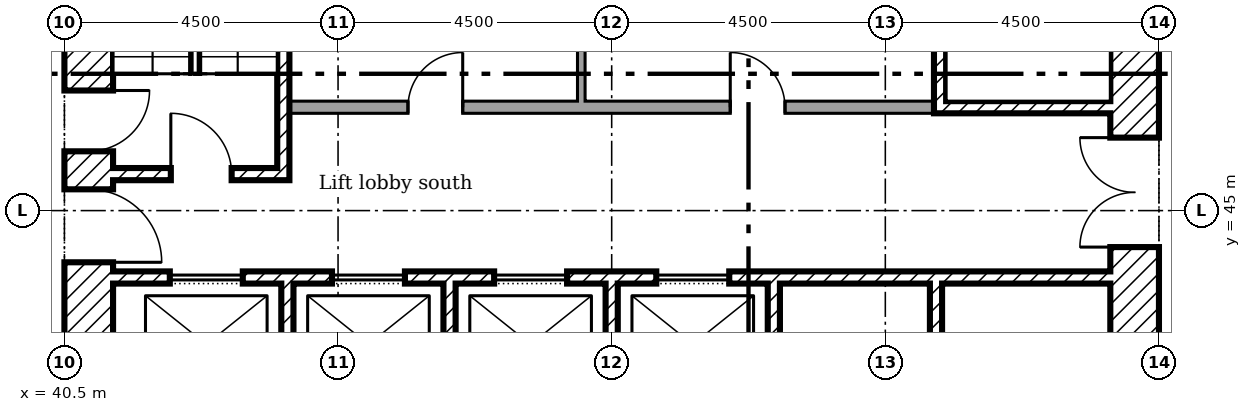
"""IFC4 building model, lengths in metres.
Left out: names, types, materials, properties, quantities, classifications, styles, units other than length and angle.
Written with IfcOpenShell. Run it as: python <this file> out.ifc"""

import sys

from ifc_helpers import new_model, si_unit, direction, frame, frame_2d, origin, place, context, subcontext, project, spatial, rectangle, extrude, element, fill, save


model = new_model("IFC4")
c1 = context("Model", 3, precision=1e-05, world=origin(), true_north=direction((0.0, 1.0)))
c2 = subcontext(c1, "Body", "Model", "MODEL_VIEW")
j1 = project(units=[si_unit("LENGTHUNIT", "METRE"), si_unit("PLANEANGLEUNIT", "RADIAN")], contexts=[c1])
p1 = place(None, origin())
s1 = spatial("IfcSite", under=j1, at=p1, CompositionType="ELEMENT")
p2 = place(p1, origin())
s2 = spatial("IfcBuilding", under=s1, at=p2, CompositionType="ELEMENT")
p3 = place(p2, frame((0.0, 0.0, 79.8)))
s3 = spatial("IfcBuildingStorey", under=s2, at=p3, CompositionType="ELEMENT", Elevation=79.8)
p4 = place(p3, frame((58.1, 40.5, 0.0), z_axis=(0.0, 0.0, 1.0), x_axis=(0.0, 1.0, 0.0)))
e1 = element("IfcWall", 1, at=p4, inside=s3, PredefinedType="SHEAR", context=c2, shape_type="SweptSolid", body=[
    extrude(rectangle(XDim=18.0, YDim=0.8, at=frame_2d((9.0, 0.0))), origin(), (0.0, 0.0, 1.0), 3.35),
])
p5 = place(p4, frame((13.15, 0.0, 0.0)))
e2 = element("IfcOpeningElement", 2, at=p5, cuts=e1, PredefinedType="OPENING", context=c2, shape_type="SweptSolid", body=[
    extrude(rectangle(XDim=1.2, YDim=2.1, at=frame_2d((0.6, 1.05))), frame((0.0, 0.41, 0.0), z_axis=(0.0, -1.0, 0.0), x_axis=(1.0, 0.0, 0.0)), (0.0, 0.0, 1.0), 0.82),
])
p6 = place(p4, frame((3.9, 0.0, 0.0)))
e3 = element("IfcOpeningElement", 3, at=p6, cuts=e1, PredefinedType="OPENING", context=c2, shape_type="SweptSolid", body=[
    extrude(rectangle(XDim=1.8, YDim=2.1, at=frame_2d((0.9, 1.05))), frame((0.0, 0.41, 0.0), z_axis=(0.0, -1.0, 0.0), x_axis=(1.0, 0.0, 0.0)), (0.0, 0.0, 1.0), 0.82),
])
p7 = place(p4, frame((11.525, 0.0, 0.0)))
e4 = element("IfcOpeningElement", 4, at=p7, cuts=e1, PredefinedType="OPENING", context=c2, shape_type="SweptSolid", body=[
    extrude(rectangle(XDim=1.0, YDim=2.1, at=frame_2d((0.5, 1.05))), frame((0.0, 0.41, 0.0), z_axis=(0.0, -1.0, 0.0), x_axis=(1.0, 0.0, 0.0)), (0.0, 0.0, 1.0), 0.82),
])
p8 = place(p3, frame((40.9, 40.5, 0.0), z_axis=(0.0, 0.0, 1.0), x_axis=(0.0, 1.0, 0.0)))
e5 = element("IfcWall", 5, at=p8, inside=s3, PredefinedType="SHEAR", context=c2, shape_type="SweptSolid", body=[
    extrude(rectangle(XDim=18.0, YDim=0.8, at=frame_2d((9.0, 0.0))), origin(), (0.0, 0.0, 1.0), 3.35),
])
p9 = place(p8, frame((3.65, 0.0, 0.0)))
e6 = element("IfcOpeningElement", 6, at=p9, cuts=e5, PredefinedType="OPENING", context=c2, shape_type="SweptSolid", body=[
    extrude(rectangle(XDim=1.2, YDim=2.1, at=frame_2d((0.6, 1.05))), frame((0.0, 0.41, 0.0), z_axis=(0.0, -1.0, 0.0), x_axis=(1.0, 0.0, 0.0)), (0.0, 0.0, 1.0), 0.82),
])
p10 = place(p8, frame((5.475, 0.0, 0.0)))
e7 = element("IfcOpeningElement", 7, at=p10, cuts=e5, PredefinedType="OPENING", context=c2, shape_type="SweptSolid", body=[
    extrude(rectangle(XDim=1.0, YDim=2.1, at=frame_2d((0.5, 1.05))), frame((0.0, 0.41, 0.0), z_axis=(0.0, -1.0, 0.0), x_axis=(1.0, 0.0, 0.0)), (0.0, 0.0, 1.0), 0.82),
])
p11 = place(p8, frame((12.3, 0.0, 0.0)))
e8 = element("IfcOpeningElement", 8, at=p11, cuts=e5, PredefinedType="OPENING", context=c2, shape_type="SweptSolid", body=[
    extrude(rectangle(XDim=1.0, YDim=2.1, at=frame_2d((0.5, 1.05))), frame((0.0, 0.41, 0.0), z_axis=(0.0, -1.0, 0.0), x_axis=(1.0, 0.0, 0.0)), (0.0, 0.0, 1.0), 0.82),
])
for number, where, z_axis, x_axis in (
    (9, (44.167, 41.3, 0.0), (0.0, 0.0, 1.0), (0.0, 1.0, 0.0)),
    (10, (46.833, 41.3, 0.0), (0.0, 0.0, 1.0), (0.0, 1.0, 0.0)),
    (11, (49.5, 41.3, 0.0), (0.0, 0.0, 1.0), (0.0, 1.0, 0.0)),
    (12, (52.167, 41.3, 0.0), (0.0, 0.0, 1.0), (0.0, 1.0, 0.0)),
    (13, (54.833, 41.3, 0.0), (0.0, 0.0, 1.0), (0.0, 1.0, 0.0)),
):
    element("IfcWall", number, at=place(p3, frame(where, z_axis=z_axis, x_axis=x_axis)), inside=s3, PredefinedType="SHEAR", context=c2, shape_type="SweptSolid", body=[
        extrude(rectangle(XDim=2.5, YDim=0.2, at=frame_2d((1.25, 0.0))), origin(), (0.0, 0.0, 1.0), 3.35),
    ])
p12 = place(p3, frame((41.3, 43.9, 0.0)))
e14 = element("IfcWall", 14, at=p12, inside=s3, PredefinedType="SHEAR", context=c2, shape_type="SweptSolid", body=[
    extrude(rectangle(XDim=16.4, YDim=0.2, at=frame_2d((8.2, 0.0))), origin(), (0.0, 0.0, 1.0), 3.35),
])
p13 = place(p12, frame((0.933, 0.0, 0.0)))
e15 = element("IfcOpeningElement", 15, at=p13, cuts=e14, PredefinedType="OPENING", context=c2, shape_type="SweptSolid", body=[
    extrude(rectangle(XDim=1.2, YDim=2.1, at=frame_2d((0.6, 1.05))), frame((0.0, 0.11, 0.0), z_axis=(0.0, -1.0, 0.0), x_axis=(1.0, 0.0, 0.0)), (0.0, 0.0, 1.0), 0.22),
])
p14 = place(p12, frame((3.6, 0.0, 0.0)))
e16 = element("IfcOpeningElement", 16, at=p14, cuts=e14, PredefinedType="OPENING", context=c2, shape_type="SweptSolid", body=[
    extrude(rectangle(XDim=1.2, YDim=2.1, at=frame_2d((0.6, 1.05))), frame((0.0, 0.11, 0.0), z_axis=(0.0, -1.0, 0.0), x_axis=(1.0, 0.0, 0.0)), (0.0, 0.0, 1.0), 0.22),
])
p15 = place(p12, frame((6.267, 0.0, 0.0)))
e17 = element("IfcOpeningElement", 17, at=p15, cuts=e14, PredefinedType="OPENING", context=c2, shape_type="SweptSolid", body=[
    extrude(rectangle(XDim=1.2, YDim=2.1, at=frame_2d((0.6, 1.05))), frame((0.0, 0.11, 0.0), z_axis=(0.0, -1.0, 0.0), x_axis=(1.0, 0.0, 0.0)), (0.0, 0.0, 1.0), 0.22),
])
p16 = place(p12, frame((8.933, 0.0, 0.0)))
e18 = element("IfcOpeningElement", 18, at=p16, cuts=e14, PredefinedType="OPENING", context=c2, shape_type="SweptSolid", body=[
    extrude(rectangle(XDim=1.2, YDim=2.1, at=frame_2d((0.6, 1.05))), frame((0.0, 0.11, 0.0), z_axis=(0.0, -1.0, 0.0), x_axis=(1.0, 0.0, 0.0)), (0.0, 0.0, 1.0), 0.22),
])
p17 = place(p3, frame((44.1, 45.5, 0.0), z_axis=(0.0, 0.0, 1.0), x_axis=(0.0, 1.0, 0.0)))
e19 = element("IfcWall", 19, at=p17, inside=s3, PredefinedType="SHEAR", context=c2, shape_type="SweptSolid", body=[
    extrude(rectangle(XDim=6.9, YDim=0.2, at=frame_2d((3.45, 0.0))), origin(), (0.0, 0.0, 1.0), 3.35),
])
p18 = place(p3, frame((41.3, 45.6, 0.0)))
e20 = element("IfcWall", 20, at=p18, inside=s3, PredefinedType="SHEAR", context=c2, shape_type="SweptSolid", body=[
    extrude(rectangle(XDim=2.7, YDim=0.2, at=frame_2d((1.35, 0.0))), origin(), (0.0, 0.0, 1.0), 3.35),
])
p19 = place(p18, frame((0.95, 0.0, 0.0)))
e21 = element("IfcOpeningElement", 21, at=p19, cuts=e20, PredefinedType="OPENING", context=c2, shape_type="SweptSolid", body=[
    extrude(rectangle(XDim=1.0, YDim=2.1, at=frame_2d((0.5, 1.05))), frame((0.0, 0.11, 0.0), z_axis=(0.0, -1.0, 0.0), x_axis=(1.0, 0.0, 0.0)), (0.0, 0.0, 1.0), 0.22),
])
p20 = place(p3, frame((54.8, 46.7, 0.0)))
e22 = element("IfcWall", 22, at=p20, inside=s3, PredefinedType="SHEAR", context=c2, shape_type="SweptSolid", body=[
    extrude(rectangle(XDim=2.9, YDim=0.2, at=frame_2d((1.45, 0.0))), origin(), (0.0, 0.0, 1.0), 3.35),
])
p21 = place(p3, frame((54.9, 46.8, 0.0), z_axis=(0.0, 0.0, 1.0), x_axis=(0.0, 1.0, 0.0)))
e23 = element("IfcWall", 23, at=p21, inside=s3, PredefinedType="SHEAR", context=c2, shape_type="SweptSolid", body=[
    extrude(rectangle(XDim=6.5, YDim=0.2, at=frame_2d((3.25, 0.0))), origin(), (0.0, 0.0, 1.0), 3.35),
])
p22 = place(p3, frame((44.2, 46.7, 0.0)))
e24 = element("IfcWall", 24, at=p22, inside=s3, PredefinedType="PARTITIONING", context=c2, shape_type="SweptSolid", body=[
    extrude(rectangle(XDim=10.6, YDim=0.2, at=frame_2d((5.3, 0.0))), origin(), (0.0, 0.0, 1.0), 3.35),
])
p23 = place(p22, frame((1.95, 0.0, 0.0)))
e25 = element("IfcOpeningElement", 25, at=p23, cuts=e24, PredefinedType="OPENING", context=c2, shape_type="SweptSolid", body=[
    extrude(rectangle(XDim=0.9, YDim=2.1, at=frame_2d((0.45, 1.05))), frame((0.0, 0.11, 0.0), z_axis=(0.0, -1.0, 0.0), x_axis=(1.0, 0.0, 0.0)), (0.0, 0.0, 1.0), 0.22),
])
p24 = place(p22, frame((7.25, 0.0, 0.0)))
e26 = element("IfcOpeningElement", 26, at=p24, cuts=e24, PredefinedType="OPENING", context=c2, shape_type="SweptSolid", body=[
    extrude(rectangle(XDim=0.9, YDim=2.1, at=frame_2d((0.45, 1.05))), frame((0.0, 0.11, 0.0), z_axis=(0.0, -1.0, 0.0), x_axis=(1.0, 0.0, 0.0)), (0.0, 0.0, 1.0), 0.22),
])
p25 = place(p3, frame((49.0, 46.8, 0.0), z_axis=(0.0, 0.0, 1.0), x_axis=(0.0, 1.0, 0.0)))
e27 = element("IfcWall", 27, at=p25, inside=s3, PredefinedType="PARTITIONING", context=c2, shape_type="SweptSolid", body=[
    extrude(rectangle(XDim=2.363, YDim=0.125, at=frame_2d((1.181, 0.0))), origin(), (0.0, 0.0, 1.0), 3.35),
])
p26 = place(p6, origin())
e28 = element("IfcDoor", 28, at=p26, inside=s3, OperationType="DOUBLE_DOOR_SINGLE_SWING", PredefinedType="DOOR", context=c2, shape_type="SweptSolid", body=[
    extrude(rectangle(XDim=1.8, YDim=2.1, at=frame_2d((0.9, 1.05))), frame((0.0, 0.025, 0.0), z_axis=(0.0, -1.0, 0.0), x_axis=(1.0, 0.0, 0.0)), (0.0, 0.0, 1.0), 0.05),
])
fill(e3, e28)
p27 = place(p9, frame((1.2, 0.0, 0.0), x_axis=(-1.0, 0.0, 0.0)))
e29 = element("IfcDoor", 29, at=p27, inside=s3, OperationType="SINGLE_SWING_LEFT", PredefinedType="DOOR", context=c2, shape_type="SweptSolid", body=[
    extrude(rectangle(XDim=1.2, YDim=2.1, at=frame_2d((0.6, 1.05))), frame((0.0, 0.025, 0.0), z_axis=(0.0, -1.0, 0.0), x_axis=(1.0, 0.0, 0.0)), (0.0, 0.0, 1.0), 0.05),
])
fill(e6, e29)
p28 = place(p19, origin())
e30 = element("IfcDoor", 30, at=p28, inside=s3, OperationType="SINGLE_SWING_RIGHT", PredefinedType="DOOR", context=c2, shape_type="SweptSolid", body=[
    extrude(rectangle(XDim=1.0, YDim=2.1, at=frame_2d((0.5, 1.05))), frame((0.0, 0.025, 0.0), z_axis=(0.0, -1.0, 0.0), x_axis=(1.0, 0.0, 0.0)), (0.0, 0.0, 1.0), 0.05),
])
fill(e21, e30)
p29 = place(p10, frame((1.0, 0.0, 0.0), x_axis=(-1.0, 0.0, 0.0)))
e31 = element("IfcDoor", 31, at=p29, inside=s3, OperationType="SINGLE_SWING_RIGHT", PredefinedType="DOOR", context=c2, shape_type="SweptSolid", body=[
    extrude(rectangle(XDim=1.0, YDim=2.1, at=frame_2d((0.5, 1.05))), frame((0.0, 0.025, 0.0), z_axis=(0.0, -1.0, 0.0), x_axis=(1.0, 0.0, 0.0)), (0.0, 0.0, 1.0), 0.05),
])
fill(e7, e31)
p30 = place(p23, origin())
e32 = element("IfcDoor", 32, at=p30, inside=s3, OperationType="SINGLE_SWING_LEFT", PredefinedType="DOOR", context=c2, shape_type="SweptSolid", body=[
    extrude(rectangle(XDim=0.9, YDim=2.1, at=frame_2d((0.45, 1.05))), frame((0.0, 0.025, 0.0), z_axis=(0.0, -1.0, 0.0), x_axis=(1.0, 0.0, 0.0)), (0.0, 0.0, 1.0), 0.05),
])
fill(e25, e32)
p31 = place(p24, origin())
e33 = element("IfcDoor", 33, at=p31, inside=s3, OperationType="SINGLE_SWING_RIGHT", PredefinedType="DOOR", context=c2, shape_type="SweptSolid", body=[
    extrude(rectangle(XDim=0.9, YDim=2.1, at=frame_2d((0.45, 1.05))), frame((0.0, 0.025, 0.0), z_axis=(0.0, -1.0, 0.0), x_axis=(1.0, 0.0, 0.0)), (0.0, 0.0, 1.0), 0.05),
])
fill(e26, e33)
p32 = place(p13, origin())
e34 = element("IfcDoor", 34, at=p32, inside=s3, OperationType="SLIDING_TO_LEFT", PredefinedType="DOOR", context=c2, shape_type="SweptSolid", body=[
    extrude(rectangle(XDim=1.2, YDim=2.1, at=frame_2d((0.6, 1.05))), frame((0.0, 0.025, 0.0), z_axis=(0.0, -1.0, 0.0), x_axis=(1.0, 0.0, 0.0)), (0.0, 0.0, 1.0), 0.05),
])
fill(e15, e34)
p33 = place(p14, origin())
e35 = element("IfcDoor", 35, at=p33, inside=s3, OperationType="SLIDING_TO_LEFT", PredefinedType="DOOR", context=c2, shape_type="SweptSolid", body=[
    extrude(rectangle(XDim=1.2, YDim=2.1, at=frame_2d((0.6, 1.05))), frame((0.0, 0.025, 0.0), z_axis=(0.0, -1.0, 0.0), x_axis=(1.0, 0.0, 0.0)), (0.0, 0.0, 1.0), 0.05),
])
fill(e16, e35)
p34 = place(p15, origin())
e36 = element("IfcDoor", 36, at=p34, inside=s3, OperationType="SLIDING_TO_LEFT", PredefinedType="DOOR", context=c2, shape_type="SweptSolid", body=[
    extrude(rectangle(XDim=1.2, YDim=2.1, at=frame_2d((0.6, 1.05))), frame((0.0, 0.025, 0.0), z_axis=(0.0, -1.0, 0.0), x_axis=(1.0, 0.0, 0.0)), (0.0, 0.0, 1.0), 0.05),
])
fill(e17, e36)
p35 = place(p16, origin())
e37 = element("IfcDoor", 37, at=p35, inside=s3, OperationType="SLIDING_TO_LEFT", PredefinedType="DOOR", context=c2, shape_type="SweptSolid", body=[
    extrude(rectangle(XDim=1.2, YDim=2.1, at=frame_2d((0.6, 1.05))), frame((0.0, 0.025, 0.0), z_axis=(0.0, -1.0, 0.0), x_axis=(1.0, 0.0, 0.0)), (0.0, 0.0, 1.0), 0.05),
])
fill(e18, e37)
save(model, sys.argv[1])
